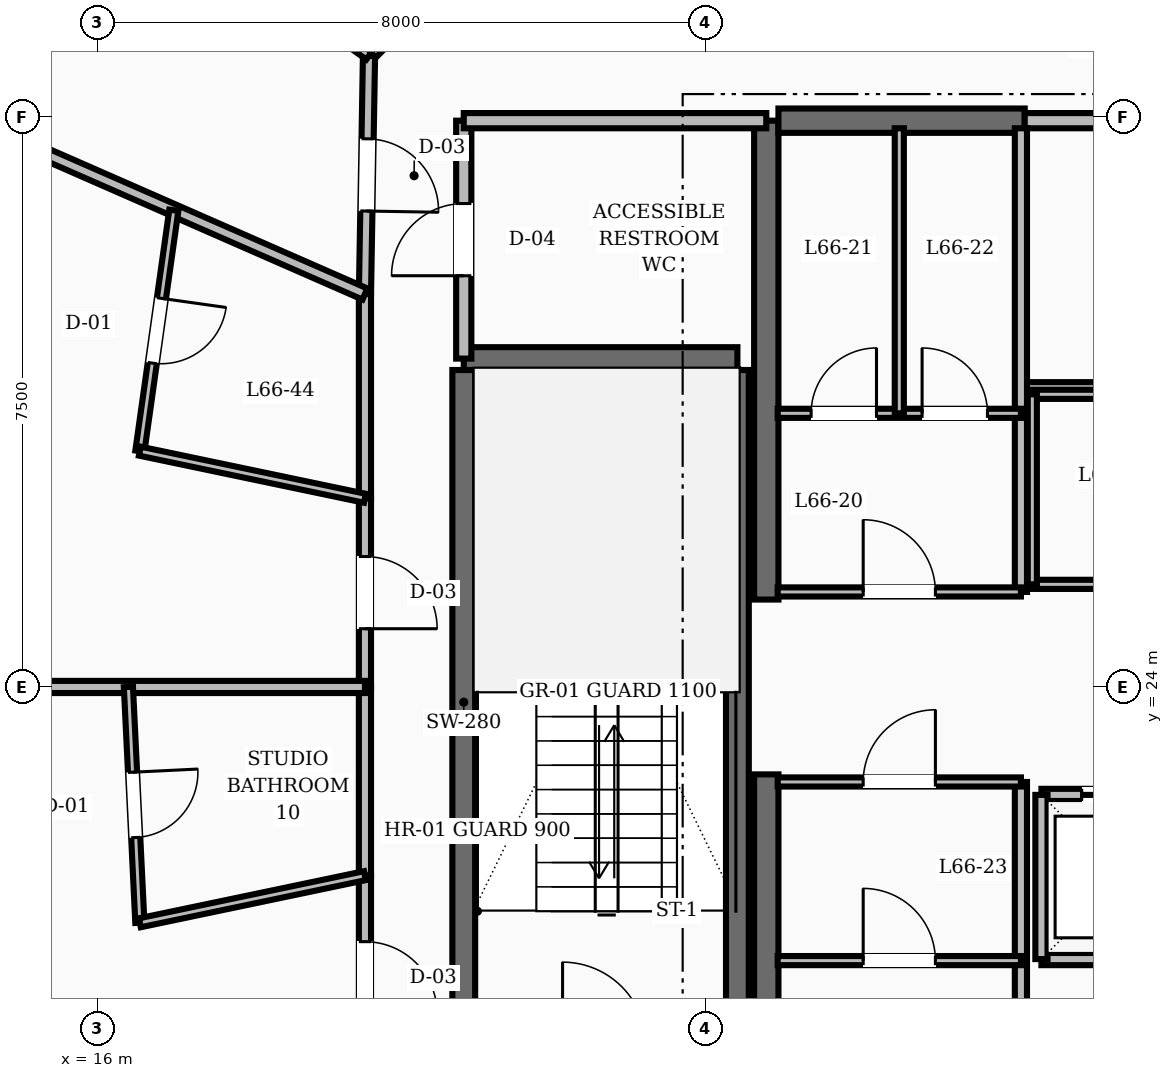
"""IFC4 building model, lengths in metres.
Left out: names, types, materials, properties, quantities, classifications, styles, units other than length and angle.
Written with IfcOpenShell. Run it as: python <this file> out.ifc"""

import sys

from ifc_helpers import new_model, si_unit, direction, frame, frame_2d, origin, place, context, subcontext, project, spatial, rectangle, extrude, element, fill, save


model = new_model("IFC4")
c1 = context("Model", 3, precision=1e-05, world=origin(), true_north=direction((0.0, 1.0)))
c2 = subcontext(c1, "Body", "Model", "MODEL_VIEW")
j1 = project(units=[si_unit("LENGTHUNIT", "METRE"), si_unit("PLANEANGLEUNIT", "RADIAN")], contexts=[c1])
p1 = place(None, origin())
s1 = spatial("IfcSite", under=j1, at=p1, CompositionType="ELEMENT")
p2 = place(p1, origin())
s2 = spatial("IfcBuilding", under=s1, at=p2, CompositionType="ELEMENT")
p3 = place(p2, frame((0.0, 0.0, 254.4)))
s3 = spatial("IfcBuildingStorey", under=s2, at=p3, CompositionType="ELEMENT", Elevation=254.4)
for number, where, z_axis, x_axis in (
    (1, (24.8, 16.55, 0.0), (0.0, 0.0, 1.0), (0.0, 1.0, 0.0)),
    (2, (24.8, 25.15, 0.0), (0.0, 0.0, 1.0), (0.0, 1.0, 0.0)),
):
    element("IfcWall", number, at=place(p3, frame(where, z_axis=z_axis, x_axis=x_axis)), inside=s3, PredefinedType="SHEAR", context=c2, shape_type="SweptSolid", body=[
        extrude(rectangle(XDim=6.3, YDim=0.32, at=frame_2d((3.15, 0.0))), origin(), (0.0, 0.0, 1.0), 3.6),
    ])
p4 = place(p3, frame((24.96, 31.45, 0.0), z_axis=(0.0, 0.0, 1.0), x_axis=(1.0, 0.0, 0.0)))
e3 = element("IfcWall", 3, at=p4, inside=s3, PredefinedType="SHEAR", context=c2, shape_type="SweptSolid", body=[
    extrude(rectangle(XDim=3.24, YDim=0.32, at=frame_2d((1.62, 0.0))), origin(), (0.0, 0.0, 1.0), 3.6),
])
for number, where, z_axis, x_axis in (
    (4, (20.82, 19.43, 0.0), (0.0, 0.0, 1.0), (0.0, 1.0, 0.0)),
    (5, (24.42, 19.43, 0.0), (0.0, 0.0, 1.0), (0.0, 1.0, 0.0)),
):
    element("IfcWall", number, at=place(p3, frame(where, z_axis=z_axis, x_axis=x_axis)), inside=s3, PredefinedType="SHEAR", context=c2, shape_type="SweptSolid", body=[
        extrude(rectangle(XDim=8.74, YDim=0.3, at=frame_2d((4.37, 0.0))), origin(), (0.0, 0.0, 1.0), 3.6),
    ])
p5 = place(p3, frame((20.82, 28.32, 0.0), z_axis=(0.0, 0.0, 1.0), x_axis=(1.0, 0.0, 0.0)))
e6 = element("IfcWall", 6, at=p5, inside=s3, PredefinedType="SHEAR", context=c2, shape_type="SweptSolid", body=[
    extrude(rectangle(XDim=3.6, YDim=0.3, at=frame_2d((1.8, 0.0))), origin(), (0.0, 0.0, 1.0), 3.6),
])
p6 = place(p3, frame((20.82, 28.32, 0.0), z_axis=(0.0, 0.0, 1.0), x_axis=(0.0, 1.0, 0.0)))
e7 = element("IfcWall", 7, at=p6, inside=s3, PredefinedType="SOLIDWALL", context=c2, shape_type="SweptSolid", body=[
    extrude(rectangle(XDim=3.13, YDim=0.2, at=frame_2d((1.565, 0.0))), origin(), (0.0, 0.0, 1.0), 2.87),
])
p7 = place(p6, frame((1.09, 0.0, 0.0)))
e8 = element("IfcOpeningElement", 8, at=p7, cuts=e7, PredefinedType="OPENING", context=c2, shape_type="SweptSolid", body=[
    extrude(rectangle(XDim=0.95, YDim=2.1, at=frame_2d((0.475, 1.05))), frame((0.0, 0.11, 0.0), z_axis=(0.0, -1.0, 0.0), x_axis=(1.0, 0.0, 0.0)), (0.0, 0.0, 1.0), 0.22),
])
p8 = place(p3, frame((20.82, 31.45, 0.0), z_axis=(0.0, 0.0, 1.0), x_axis=(1.0, 0.0, 0.0)))
e9 = element("IfcWall", 9, at=p8, inside=s3, PredefinedType="SOLIDWALL", context=c2, shape_type="SweptSolid", body=[
    extrude(rectangle(XDim=3.98, YDim=0.2, at=frame_2d((1.99, 0.0))), origin(), (0.0, 0.0, 1.0), 2.87),
])
p9 = place(p3, frame((28.42, 22.58, 0.0), z_axis=(0.0, 0.0, 1.0), x_axis=(1.0, 0.0, 0.0)))
e10 = element("IfcWall", 10, at=p9, inside=s3, PredefinedType="SOLIDWALL", context=c2, shape_type="SweptSolid", body=[
    extrude(rectangle(XDim=2.16, YDim=0.16, at=frame_2d((1.08, 0.0))), origin(), (0.0, 0.0, 1.0), 2.87),
])
p10 = place(p9, frame((0.53, 0.0, 0.0)))
e11 = element("IfcOpeningElement", 11, at=p10, cuts=e10, PredefinedType="OPENING", context=c2, shape_type="SweptSolid", body=[
    extrude(rectangle(XDim=1.1, YDim=2.15, at=frame_2d((0.55, 1.075))), frame((0.0, 0.09, 0.0), z_axis=(0.0, -1.0, 0.0), x_axis=(1.0, 0.0, 0.0)), (0.0, 0.0, 1.0), 0.18),
])
for number, where, z_axis, x_axis in (
    (12, (28.42, 20.42, 0.0), (0.0, 0.0, 1.0), (1.0, 0.0, 0.0)),
    (13, (28.42, 20.42, 0.0), (0.0, 0.0, 1.0), (0.0, 1.0, 0.0)),
):
    element("IfcWall", number, at=place(p3, frame(where, z_axis=z_axis, x_axis=x_axis)), inside=s3, PredefinedType="SOLIDWALL", context=c2, shape_type="SweptSolid", body=[
        extrude(rectangle(XDim=2.16, YDim=0.16, at=frame_2d((1.08, 0.0))), origin(), (0.0, 0.0, 1.0), 2.87),
    ])
p11 = place(p3, frame((28.2, 31.45, 0.0), z_axis=(0.0, 0.0, 1.0), x_axis=(1.0, 0.0, 0.0)))
e14 = element("IfcWall", 14, at=p11, inside=s3, PredefinedType="SOLIDWALL", context=c2, shape_type="SweptSolid", body=[
    extrude(rectangle(XDim=7.6, YDim=0.2, at=frame_2d((3.8, 0.0))), origin(), (0.0, 0.0, 1.0), 2.87),
])
p12 = place(p11, frame((1.0, 0.0, 0.0)))
e15 = element("IfcOpeningElement", 15, at=p12, cuts=e14, PredefinedType="OPENING", context=c2, shape_type="SweptSolid", body=[
    extrude(rectangle(XDim=0.95, YDim=2.1, at=frame_2d((0.475, 1.05))), frame((0.0, 0.11, 0.0), z_axis=(0.0, -1.0, 0.0), x_axis=(1.0, 0.0, 0.0)), (0.0, 0.0, 1.0), 0.22),
])
p13 = place(p3, frame((28.2, 27.95, 0.0), z_axis=(0.0, 0.0, 1.0), x_axis=(1.0, 0.0, 0.0)))
e16 = element("IfcWall", 16, at=p13, inside=s3, PredefinedType="PARTITIONING", context=c2, shape_type="SweptSolid", body=[
    extrude(rectangle(XDim=7.6, YDim=0.12, at=frame_2d((3.8, 0.0))), origin(), (0.0, 0.0, 1.0), 2.87),
])
p14 = place(p3, frame((28.3, 25.35, 0.0), z_axis=(0.0, 0.0, 1.0), x_axis=(1.0, 0.0, 0.0)))
e17 = element("IfcWall", 17, at=p14, inside=s3, PredefinedType="PARTITIONING", context=c2, shape_type="SweptSolid", body=[
    extrude(rectangle(XDim=4.95, YDim=0.12, at=frame_2d((2.475, 0.0))), origin(), (0.0, 0.0, 1.0), 2.87),
])
p15 = place(p14, frame((2.0, 0.0, 0.0)))
e18 = element("IfcOpeningElement", 18, at=p15, cuts=e17, PredefinedType="OPENING", context=c2, shape_type="SweptSolid", body=[
    extrude(rectangle(XDim=0.95, YDim=2.1, at=frame_2d((0.475, 1.05))), frame((0.0, 0.07, 0.0), z_axis=(0.0, -1.0, 0.0), x_axis=(1.0, 0.0, 0.0)), (0.0, 0.0, 1.0), 0.14),
])
p16 = place(p3, frame((28.3, 27.85, 0.0), z_axis=(0.0, 0.0, 1.0), x_axis=(1.0, 0.0, 0.0)))
e19 = element("IfcWall", 19, at=p16, inside=s3, PredefinedType="PARTITIONING", context=c2, shape_type="SweptSolid", body=[
    extrude(rectangle(XDim=4.95, YDim=0.12, at=frame_2d((2.475, 0.0))), origin(), (0.0, 0.0, 1.0), 2.87),
])
p17 = place(p3, frame((28.3, 25.35, 0.0), z_axis=(0.0, 0.0, 1.0), x_axis=(0.0, 1.0, 0.0)))
e20 = element("IfcWall", 20, at=p17, inside=s3, PredefinedType="PARTITIONING", context=c2, shape_type="SweptSolid", body=[
    extrude(rectangle(XDim=2.5, YDim=0.12, at=frame_2d((1.25, 0.0))), origin(), (0.0, 0.0, 1.0), 2.87),
])
p18 = place(p3, frame((28.15, 16.7, 0.0), z_axis=(0.0, 0.0, 1.0), x_axis=(0.0, 1.0, 0.0)))
e21 = element("IfcWall", 21, at=p18, inside=s3, PredefinedType="SOLIDWALL", context=c2, shape_type="SweptSolid", body=[
    extrude(rectangle(XDim=6.05, YDim=0.16, at=frame_2d((3.025, 0.0))), origin(), (0.0, 0.0, 1.0), 2.87),
])
p19 = place(p3, frame((28.15, 25.25, 0.0), z_axis=(0.0, 0.0, 1.0), x_axis=(0.0, 1.0, 0.0)))
e22 = element("IfcWall", 22, at=p19, inside=s3, PredefinedType="SOLIDWALL", context=c2, shape_type="SweptSolid", body=[
    extrude(rectangle(XDim=6.1, YDim=0.16, at=frame_2d((3.05, 0.0))), origin(), (0.0, 0.0, 1.0), 2.87),
])
p20 = place(p3, frame((24.95, 25.25, 0.0), z_axis=(0.0, 0.0, 1.0), x_axis=(1.0, 0.0, 0.0)))
e23 = element("IfcWall", 23, at=p20, inside=s3, PredefinedType="PARTITIONING", context=c2, shape_type="SweptSolid", body=[
    extrude(rectangle(XDim=3.2, YDim=0.12, at=frame_2d((1.6, 0.0))), origin(), (0.0, 0.0, 1.0), 2.87),
])
p21 = place(p20, frame((1.125, 0.0, 0.0)))
e24 = element("IfcOpeningElement", 24, at=p21, cuts=e23, PredefinedType="OPENING", context=c2, shape_type="SweptSolid", body=[
    extrude(rectangle(XDim=0.95, YDim=2.1, at=frame_2d((0.475, 1.05))), frame((0.0, 0.07, 0.0), z_axis=(0.0, -1.0, 0.0), x_axis=(1.0, 0.0, 0.0)), (0.0, 0.0, 1.0), 0.14),
])
p22 = place(p3, frame((24.95, 22.75, 0.0), z_axis=(0.0, 0.0, 1.0), x_axis=(1.0, 0.0, 0.0)))
e25 = element("IfcWall", 25, at=p22, inside=s3, PredefinedType="PARTITIONING", context=c2, shape_type="SweptSolid", body=[
    extrude(rectangle(XDim=3.2, YDim=0.12, at=frame_2d((1.6, 0.0))), origin(), (0.0, 0.0, 1.0), 2.87),
])
p23 = place(p22, frame((1.125, 0.0, 0.0)))
e26 = element("IfcOpeningElement", 26, at=p23, cuts=e25, PredefinedType="OPENING", context=c2, shape_type="SweptSolid", body=[
    extrude(rectangle(XDim=0.95, YDim=2.1, at=frame_2d((0.475, 1.05))), frame((0.0, 0.07, 0.0), z_axis=(0.0, -1.0, 0.0), x_axis=(1.0, 0.0, 0.0)), (0.0, 0.0, 1.0), 0.14),
])
p24 = place(p3, frame((24.95, 27.6, 0.0), z_axis=(0.0, 0.0, 1.0), x_axis=(1.0, 0.0, 0.0)))
e27 = element("IfcWall", 27, at=p24, inside=s3, PredefinedType="PARTITIONING", context=c2, shape_type="SweptSolid", body=[
    extrude(rectangle(XDim=3.2, YDim=0.12, at=frame_2d((1.6, 0.0))), origin(), (0.0, 0.0, 1.0), 2.87),
])
p25 = place(p24, frame((0.44, 0.0, 0.0)))
e28 = element("IfcOpeningElement", 28, at=p25, cuts=e27, PredefinedType="OPENING", context=c2, shape_type="SweptSolid", body=[
    extrude(rectangle(XDim=0.86, YDim=2.1, at=frame_2d((0.43, 1.05))), frame((0.0, 0.07, 0.0), z_axis=(0.0, -1.0, 0.0), x_axis=(1.0, 0.0, 0.0)), (0.0, 0.0, 1.0), 0.14),
])
p26 = place(p24, frame((1.9, 0.0, 0.0)))
e29 = element("IfcOpeningElement", 29, at=p26, cuts=e27, PredefinedType="OPENING", context=c2, shape_type="SweptSolid", body=[
    extrude(rectangle(XDim=0.86, YDim=2.1, at=frame_2d((0.43, 1.05))), frame((0.0, 0.07, 0.0), z_axis=(0.0, -1.0, 0.0), x_axis=(1.0, 0.0, 0.0)), (0.0, 0.0, 1.0), 0.14),
])
p27 = place(p3, frame((26.55, 27.6, 0.0), z_axis=(0.0, 0.0, 1.0), x_axis=(0.0, 1.0, 0.0)))
e30 = element("IfcWall", 30, at=p27, inside=s3, PredefinedType="PARTITIONING", context=c2, shape_type="SweptSolid", body=[
    extrude(rectangle(XDim=3.75, YDim=0.12, at=frame_2d((1.875, 0.0))), origin(), (0.0, 0.0, 1.0), 2.87),
])
p28 = place(p3, frame((24.95, 20.4, 0.0), z_axis=(0.0, 0.0, 1.0), x_axis=(1.0, 0.0, 0.0)))
e31 = element("IfcWall", 31, at=p28, inside=s3, PredefinedType="PARTITIONING", context=c2, shape_type="SweptSolid", body=[
    extrude(rectangle(XDim=3.2, YDim=0.12, at=frame_2d((1.6, 0.0))), origin(), (0.0, 0.0, 1.0), 2.87),
])
p29 = place(p28, frame((1.125, 0.0, 0.0)))
e32 = element("IfcOpeningElement", 32, at=p29, cuts=e31, PredefinedType="OPENING", context=c2, shape_type="SweptSolid", body=[
    extrude(rectangle(XDim=0.95, YDim=2.1, at=frame_2d((0.475, 1.05))), frame((0.0, 0.07, 0.0), z_axis=(0.0, -1.0, 0.0), x_axis=(1.0, 0.0, 0.0)), (0.0, 0.0, 1.0), 0.14),
])
p30 = place(p3, frame((21.635, 34.365, 0.0), z_axis=(0.0, 0.0, 1.0), x_axis=(-0.707106781187, -0.707106781187, 0.0)))
e33 = element("IfcWall", 33, at=p30, inside=s3, PredefinedType="SOLIDWALL", context=c2, shape_type="SweptSolid", body=[
    extrude(rectangle(XDim=2.916, YDim=0.16, at=frame_2d((1.458, 0.0))), origin(), (0.0, 0.0, 1.0), 2.87),
])
p31 = place(p3, frame((19.573, 32.303, 0.0), z_axis=(0.0, 0.0, 1.0), x_axis=(-0.016981035134, -0.999855811828, 0.0)))
e34 = element("IfcWall", 34, at=p31, inside=s3, PredefinedType="SOLIDWALL", context=c2, shape_type="SweptSolid", body=[
    extrude(rectangle(XDim=3.134, YDim=0.16, at=frame_2d((1.567, 0.0))), origin(), (0.0, 0.0, 1.0), 2.87),
])
p32 = place(p31, frame((1.092, 0.0, 0.0)))
e35 = element("IfcOpeningElement", 35, at=p32, cuts=e34, PredefinedType="OPENING", context=c2, shape_type="SweptSolid", body=[
    extrude(rectangle(XDim=0.95, YDim=2.1, at=frame_2d((0.475, 1.05))), frame((0.0, 0.09, 0.0), z_axis=(0.0, -1.0, 0.0), x_axis=(1.0, 0.0, 0.0)), (0.0, 0.0, 1.0), 0.18),
])
p33 = place(p3, frame((19.52, 29.169, 0.0), z_axis=(0.0, 0.0, 1.0), x_axis=(0.0, -1.0, 0.0)))
e36 = element("IfcWall", 36, at=p33, inside=s3, PredefinedType="SOLIDWALL", context=c2, shape_type="SweptSolid", body=[
    extrude(rectangle(XDim=2.687, YDim=0.16, at=frame_2d((1.344, 0.0))), origin(), (0.0, 0.0, 1.0), 2.87),
])
p34 = place(p3, frame((19.52, 26.482, 0.0), z_axis=(0.0, 0.0, 1.0), x_axis=(0.0, -1.0, 0.0)))
e37 = element("IfcWall", 37, at=p34, inside=s3, PredefinedType="SOLIDWALL", context=c2, shape_type="SweptSolid", body=[
    extrude(rectangle(XDim=2.482, YDim=0.16, at=frame_2d((1.241, 0.0))), origin(), (0.0, 0.0, 1.0), 2.87),
])
p35 = place(p34, frame((0.766, 0.0, 0.0)))
e38 = element("IfcOpeningElement", 38, at=p35, cuts=e37, PredefinedType="OPENING", context=c2, shape_type="SweptSolid", body=[
    extrude(rectangle(XDim=0.95, YDim=2.1, at=frame_2d((0.475, 1.05))), frame((0.0, 0.09, 0.0), z_axis=(0.0, -1.0, 0.0), x_axis=(1.0, 0.0, 0.0)), (0.0, 0.0, 1.0), 0.18),
])
p36 = place(p3, frame((19.52, 24.0, 0.0), z_axis=(0.0, 0.0, 1.0), x_axis=(0.0, -1.0, 0.0)))
e39 = element("IfcWall", 39, at=p36, inside=s3, PredefinedType="SOLIDWALL", context=c2, shape_type="SweptSolid", body=[
    extrude(rectangle(XDim=2.482, YDim=0.16, at=frame_2d((1.241, 0.0))), origin(), (0.0, 0.0, 1.0), 2.87),
])
p37 = place(p3, frame((19.52, 21.518, 0.0), z_axis=(0.0, 0.0, 1.0), x_axis=(0.0, -1.0, 0.0)))
e40 = element("IfcWall", 40, at=p37, inside=s3, PredefinedType="SOLIDWALL", context=c2, shape_type="SweptSolid", body=[
    extrude(rectangle(XDim=2.687, YDim=0.16, at=frame_2d((1.344, 0.0))), origin(), (0.0, 0.0, 1.0), 2.87),
])
p38 = place(p37, frame((0.868, 0.0, 0.0)))
e41 = element("IfcOpeningElement", 41, at=p38, cuts=e40, PredefinedType="OPENING", context=c2, shape_type="SweptSolid", body=[
    extrude(rectangle(XDim=0.95, YDim=2.1, at=frame_2d((0.475, 1.05))), frame((0.0, 0.09, 0.0), z_axis=(0.0, -1.0, 0.0), x_axis=(1.0, 0.0, 0.0)), (0.0, 0.0, 1.0), 0.18),
])
p39 = place(p3, frame((19.573, 32.303, 0.0), z_axis=(0.0, 0.0, 1.0), x_axis=(-0.812768639955, 0.582586592624, 0.0)))
e42 = element("IfcWall", 42, at=p39, inside=s3, PredefinedType="PARTITIONING", context=c2, shape_type="SweptSolid", body=[
    extrude(rectangle(XDim=2.225, YDim=0.12, at=frame_2d((1.113, 0.0))), origin(), (0.0, 0.0, 1.0), 2.87),
])
p40 = place(p3, frame((19.52, 29.169, 0.0), z_axis=(0.0, 0.0, 1.0), x_axis=(-0.915894694272, 0.40141862065, 0.0)))
e43 = element("IfcWall", 43, at=p40, inside=s3, PredefinedType="SOLIDWALL", context=c2, shape_type="SweptSolid", body=[
    extrude(rectangle(XDim=7.174, YDim=0.16, at=frame_2d((3.587, 0.0))), origin(), (0.0, 0.0, 1.0), 2.87),
])
p41 = place(p3, frame((17.006, 30.271, 0.0), z_axis=(0.0, 0.0, 1.0), x_axis=(-0.139680283356, -0.990196656448, 0.0)))
e44 = element("IfcWall", 44, at=p41, inside=s3, PredefinedType="PARTITIONING", context=c2, shape_type="SweptSolid", body=[
    extrude(rectangle(XDim=3.2, YDim=0.12, at=frame_2d((1.6, 0.0))), origin(), (0.0, 0.0, 1.0), 2.87),
])
p42 = place(p41, frame((1.17, 0.0, 0.0)))
e45 = element("IfcOpeningElement", 45, at=p42, cuts=e44, PredefinedType="OPENING", context=c2, shape_type="SweptSolid", body=[
    extrude(rectangle(XDim=0.86, YDim=2.1, at=frame_2d((0.43, 1.05))), frame((0.0, 0.07, 0.0), z_axis=(0.0, -1.0, 0.0), x_axis=(1.0, 0.0, 0.0)), (0.0, 0.0, 1.0), 0.14),
])
p43 = place(p3, frame((19.52, 26.482, 0.0), z_axis=(0.0, 0.0, 1.0), x_axis=(-0.978784603848, 0.204891920947, 0.0)))
e46 = element("IfcWall", 46, at=p43, inside=s3, PredefinedType="PARTITIONING", context=c2, shape_type="SweptSolid", body=[
    extrude(rectangle(XDim=3.025, YDim=0.12, at=frame_2d((1.513, 0.0))), origin(), (0.0, 0.0, 1.0), 2.87),
])
p44 = place(p3, frame((19.52, 24.0, 0.0), z_axis=(0.0, 0.0, 1.0), x_axis=(-1.0, 0.0, 0.0)))
e47 = element("IfcWall", 47, at=p44, inside=s3, PredefinedType="SOLIDWALL", context=c2, shape_type="SweptSolid", body=[
    extrude(rectangle(XDim=8.14, YDim=0.16, at=frame_2d((4.07, 0.0))), origin(), (0.0, 0.0, 1.0), 2.87),
])
p45 = place(p3, frame((16.408, 24.0, 0.0), z_axis=(0.0, 0.0, 1.0), x_axis=(0.048577194341, -0.998819431224, 0.0)))
e48 = element("IfcWall", 48, at=p45, inside=s3, PredefinedType="PARTITIONING", context=c2, shape_type="SweptSolid", body=[
    extrude(rectangle(XDim=3.106, YDim=0.12, at=frame_2d((1.553, 0.0))), origin(), (0.0, 0.0, 1.0), 2.87),
])
p46 = place(p45, frame((1.123, 0.0, 0.0)))
e49 = element("IfcOpeningElement", 49, at=p46, cuts=e48, PredefinedType="OPENING", context=c2, shape_type="SweptSolid", body=[
    extrude(rectangle(XDim=0.86, YDim=2.1, at=frame_2d((0.43, 1.05))), frame((0.0, 0.07, 0.0), z_axis=(0.0, -1.0, 0.0), x_axis=(1.0, 0.0, 0.0)), (0.0, 0.0, 1.0), 0.14),
])
p47 = place(p3, frame((19.52, 21.518, 0.0), z_axis=(0.0, 0.0, 1.0), x_axis=(-0.978784603848, -0.204891920947, 0.0)))
e50 = element("IfcWall", 50, at=p47, inside=s3, PredefinedType="PARTITIONING", context=c2, shape_type="SweptSolid", body=[
    extrude(rectangle(XDim=3.025, YDim=0.12, at=frame_2d((1.513, 0.0))), origin(), (0.0, 0.0, 1.0), 2.87),
])
p48 = place(p7, origin())
e51 = element("IfcDoor", 51, at=p48, inside=s3, OperationType="SINGLE_SWING_LEFT", PredefinedType="DOOR", context=c2, shape_type="SweptSolid", body=[
    extrude(rectangle(XDim=0.95, YDim=2.1, at=frame_2d((0.475, 1.05))), frame((0.0, 0.025, 0.0), z_axis=(0.0, -1.0, 0.0), x_axis=(1.0, 0.0, 0.0)), (0.0, 0.0, 1.0), 0.05),
])
fill(e8, e51)
p49 = place(p10, origin())
e52 = element("IfcDoor", 52, at=p49, inside=s3, OperationType="SLIDING_TO_LEFT", PredefinedType="DOOR", context=c2, shape_type="SweptSolid", body=[
    extrude(rectangle(XDim=1.1, YDim=2.15, at=frame_2d((0.55, 1.075))), frame((0.0, 0.025, 0.0), z_axis=(0.0, -1.0, 0.0), x_axis=(1.0, 0.0, 0.0)), (0.0, 0.0, 1.0), 0.05),
])
fill(e11, e52)
p50 = place(p21, origin())
e53 = element("IfcDoor", 53, at=p50, inside=s3, OperationType="SINGLE_SWING_LEFT", PredefinedType="DOOR", context=c2, shape_type="SweptSolid", body=[
    extrude(rectangle(XDim=0.95, YDim=2.1, at=frame_2d((0.475, 1.05))), frame((0.0, 0.025, 0.0), z_axis=(0.0, -1.0, 0.0), x_axis=(1.0, 0.0, 0.0)), (0.0, 0.0, 1.0), 0.05),
])
fill(e24, e53)
p51 = place(p25, origin())
e54 = element("IfcDoor", 54, at=p51, inside=s3, OperationType="SINGLE_SWING_RIGHT", PredefinedType="DOOR", context=c2, shape_type="SweptSolid", body=[
    extrude(rectangle(XDim=0.86, YDim=2.1, at=frame_2d((0.43, 1.05))), frame((0.0, 0.025, 0.0), z_axis=(0.0, -1.0, 0.0), x_axis=(1.0, 0.0, 0.0)), (0.0, 0.0, 1.0), 0.05),
])
fill(e28, e54)
p52 = place(p26, origin())
e55 = element("IfcDoor", 55, at=p52, inside=s3, OperationType="SINGLE_SWING_LEFT", PredefinedType="DOOR", context=c2, shape_type="SweptSolid", body=[
    extrude(rectangle(XDim=0.86, YDim=2.1, at=frame_2d((0.43, 1.05))), frame((0.0, 0.025, 0.0), z_axis=(0.0, -1.0, 0.0), x_axis=(1.0, 0.0, 0.0)), (0.0, 0.0, 1.0), 0.05),
])
fill(e29, e55)
p53 = place(p23, origin())
e56 = element("IfcDoor", 56, at=p53, inside=s3, OperationType="SINGLE_SWING_RIGHT", PredefinedType="DOOR", context=c2, shape_type="SweptSolid", body=[
    extrude(rectangle(XDim=0.95, YDim=2.1, at=frame_2d((0.475, 1.05))), frame((0.0, 0.025, 0.0), z_axis=(0.0, -1.0, 0.0), x_axis=(1.0, 0.0, 0.0)), (0.0, 0.0, 1.0), 0.05),
])
fill(e26, e56)
p54 = place(p29, origin())
e57 = element("IfcDoor", 57, at=p54, inside=s3, OperationType="SINGLE_SWING_LEFT", PredefinedType="DOOR", context=c2, shape_type="SweptSolid", body=[
    extrude(rectangle(XDim=0.95, YDim=2.1, at=frame_2d((0.475, 1.05))), frame((0.0, 0.025, 0.0), z_axis=(0.0, -1.0, 0.0), x_axis=(1.0, 0.0, 0.0)), (0.0, 0.0, 1.0), 0.05),
])
fill(e32, e57)
p55 = place(p32, origin())
e58 = element("IfcDoor", 58, at=p55, inside=s3, OperationType="SINGLE_SWING_RIGHT", PredefinedType="DOOR", context=c2, shape_type="SweptSolid", body=[
    extrude(rectangle(XDim=0.95, YDim=2.1, at=frame_2d((0.475, 1.05))), frame((0.0, 0.025, 0.0), z_axis=(0.0, -1.0, 0.0), x_axis=(1.0, 0.0, 0.0)), (0.0, 0.0, 1.0), 0.05),
])
fill(e35, e58)
p56 = place(p42, origin())
e59 = element("IfcDoor", 59, at=p56, inside=s3, OperationType="SINGLE_SWING_LEFT", PredefinedType="DOOR", context=c2, shape_type="SweptSolid", body=[
    extrude(rectangle(XDim=0.86, YDim=2.1, at=frame_2d((0.43, 1.05))), frame((0.0, 0.025, 0.0), z_axis=(0.0, -1.0, 0.0), x_axis=(1.0, 0.0, 0.0)), (0.0, 0.0, 1.0), 0.05),
])
fill(e45, e59)
p57 = place(p35, origin())
e60 = element("IfcDoor", 60, at=p57, inside=s3, OperationType="SINGLE_SWING_RIGHT", PredefinedType="DOOR", context=c2, shape_type="SweptSolid", body=[
    extrude(rectangle(XDim=0.95, YDim=2.1, at=frame_2d((0.475, 1.05))), frame((0.0, 0.025, 0.0), z_axis=(0.0, -1.0, 0.0), x_axis=(1.0, 0.0, 0.0)), (0.0, 0.0, 1.0), 0.05),
])
fill(e38, e60)
p58 = place(p46, origin())
e61 = element("IfcDoor", 61, at=p58, inside=s3, OperationType="SINGLE_SWING_LEFT", PredefinedType="DOOR", context=c2, shape_type="SweptSolid", body=[
    extrude(rectangle(XDim=0.86, YDim=2.1, at=frame_2d((0.43, 1.05))), frame((0.0, 0.025, 0.0), z_axis=(0.0, -1.0, 0.0), x_axis=(1.0, 0.0, 0.0)), (0.0, 0.0, 1.0), 0.05),
])
fill(e49, e61)
p59 = place(p38, origin())
e62 = element("IfcDoor", 62, at=p59, inside=s3, OperationType="SINGLE_SWING_RIGHT", PredefinedType="DOOR", context=c2, shape_type="SweptSolid", body=[
    extrude(rectangle(XDim=0.95, YDim=2.1, at=frame_2d((0.475, 1.05))), frame((0.0, 0.025, 0.0), z_axis=(0.0, -1.0, 0.0), x_axis=(1.0, 0.0, 0.0)), (0.0, 0.0, 1.0), 0.05),
])
fill(e41, e62)
save(model, sys.argv[1])
